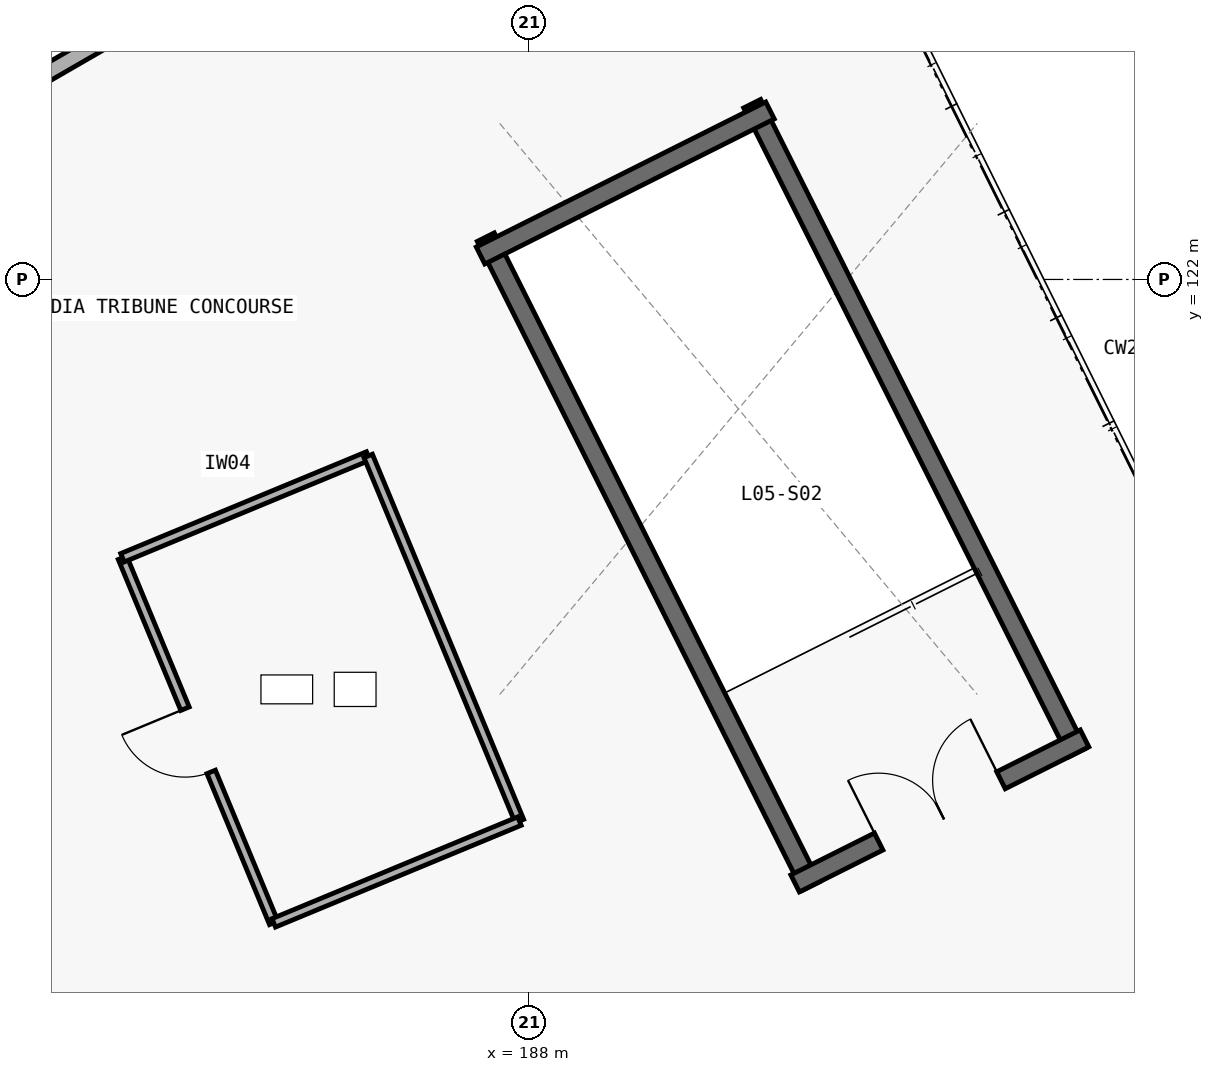
"""IFC4 building model, lengths in metres.
Left out: names, types, materials, properties, quantities, classifications, styles, units other than length and angle.
Written with IfcOpenShell. Run it as: python <this file> out.ifc"""

import sys

from ifc_helpers import new_model, si_unit, direction, frame, frame_2d, origin, place, context, subcontext, project, spatial, rectangle, extrude, element, fill, save


model = new_model("IFC4")
c1 = context("Model", 3, precision=1e-05, world=origin(), true_north=direction((0.0, 1.0)))
c2 = subcontext(c1, "Body", "Model", "MODEL_VIEW")
j1 = project(units=[si_unit("LENGTHUNIT", "METRE"), si_unit("PLANEANGLEUNIT", "RADIAN")], contexts=[c1])
p1 = place(None, origin())
s1 = spatial("IfcSite", under=j1, at=p1, CompositionType="ELEMENT")
p2 = place(p1, origin())
s2 = spatial("IfcBuilding", under=s1, at=p2, CompositionType="ELEMENT")
p3 = place(p2, frame((0.0, 0.0, 24.6)))
s3 = spatial("IfcBuildingStorey", under=s2, at=p3, CompositionType="ELEMENT", Elevation=24.6)
p4 = place(p3, frame((176.519, 121.75, 0.0), z_axis=(0.0, 0.0, 1.0), x_axis=(0.866019999656, 0.500009360108, 0.0)))
e1 = element("IfcWall", 1, at=p4, inside=s3, PredefinedType="PARAPET", context=c2, shape_type="SweptSolid", body=[
    extrude(rectangle(XDim=16.5, YDim=0.22, at=frame_2d((8.25, 0.0))), origin(), (0.0, 0.0, 1.0), 3.89),
])
for number, where, z_axis, x_axis in (
    (2, (195.215, 115.774, 0.0), (0.0, 0.0, 1.0), (-0.448, 0.894, 0.0)),
    (3, (187.432, 122.557, 0.0), (0.0, 0.0, 1.0), (0.448, -0.894, 0.0)),
):
    element("IfcWall", number, at=place(p3, frame(where, z_axis=z_axis, x_axis=x_axis)), inside=s3, PredefinedType="SHEAR", context=c2, shape_type="SweptSolid", body=[
        extrude(rectangle(XDim=9.55, YDim=0.25, at=frame_2d((4.775, 0.0))), origin(), (0.0, 0.0, 1.0), 4.62),
    ])
p5 = place(p3, frame((191.502, 114.054, 0.0), z_axis=(0.0, 0.0, 1.0), x_axis=(0.89409454548, 0.447878268888, 0.0)))
e4 = element("IfcWall", 4, at=p5, inside=s3, PredefinedType="SHEAR", context=c2, shape_type="SweptSolid", body=[
    extrude(rectangle(XDim=4.26, YDim=0.25, at=frame_2d((2.13, 0.0))), origin(), (0.0, 0.0, 1.0), 4.62),
])
p6 = place(p5, frame((1.23, 0.0, 0.0)))
e5 = element("IfcOpeningElement", 5, at=p6, cuts=e4, PredefinedType="OPENING", context=c2, shape_type="SweptSolid", body=[
    extrude(rectangle(XDim=1.8, YDim=2.25, at=frame_2d((0.9, 1.125))), frame((0.0, 0.135, 0.0), z_axis=(0.0, -1.0, 0.0), x_axis=(1.0, 0.0, 0.0)), (0.0, 0.0, 1.0), 0.27),
])
p7 = place(p3, frame((191.172, 124.223, 0.0), z_axis=(0.0, 0.0, 1.0), x_axis=(-0.89409454548, -0.447878268888, 0.0)))
e6 = element("IfcWall", 6, at=p7, inside=s3, PredefinedType="SHEAR", context=c2, shape_type="SweptSolid", body=[
    extrude(rectangle(XDim=4.26, YDim=0.25, at=frame_2d((2.13, 0.0))), origin(), (0.0, 0.0, 1.0), 4.62),
])
p8 = place(p3, frame((184.642, 113.535, 0.0), z_axis=(0.0, 0.0, 1.0), x_axis=(-0.38268766097, 0.923877780955, 0.0)))
e7 = element("IfcWall", 7, at=p8, inside=s3, PredefinedType="PARTITIONING", context=c2, shape_type="SweptSolid", body=[
    extrude(rectangle(XDim=5.2, YDim=0.12, at=frame_2d((2.6, 0.0))), origin(), (0.0, 0.0, 1.0), 4.6),
])
p9 = place(p8, frame((2.15, 0.0, 0.0)))
e8 = element("IfcOpeningElement", 8, at=p9, cuts=e7, PredefinedType="OPENING", context=c2, shape_type="SweptSolid", body=[
    extrude(rectangle(XDim=0.9, YDim=2.1, at=frame_2d((0.45, 1.05))), frame((0.0, 0.07, 0.0), z_axis=(0.0, -1.0, 0.0), x_axis=(1.0, 0.0, 0.0)), (0.0, 0.0, 1.0), 0.14),
])
p10 = place(p3, frame((182.652, 118.339, 0.0), z_axis=(0.0, 0.0, 1.0), x_axis=(0.923904592733, 0.382622926034, 0.0)))
e9 = element("IfcWall", 9, at=p10, inside=s3, PredefinedType="PARTITIONING", context=c2, shape_type="SweptSolid", body=[
    extrude(rectangle(XDim=3.499, YDim=0.12, at=frame_2d((1.75, 0.0))), origin(), (0.0, 0.0, 1.0), 4.6),
])
p11 = place(p3, frame((185.885, 119.678, 0.0), z_axis=(0.0, 0.0, 1.0), x_axis=(0.382704261034, -0.923870904719, 0.0)))
e10 = element("IfcWall", 10, at=p11, inside=s3, PredefinedType="PARTITIONING", context=c2, shape_type="SweptSolid", body=[
    extrude(rectangle(XDim=5.2, YDim=0.12, at=frame_2d((2.6, 0.0))), origin(), (0.0, 0.0, 1.0), 4.6),
])
p12 = place(p3, frame((187.875, 114.874, 0.0), z_axis=(0.0, 0.0, 1.0), x_axis=(-0.923879927009, -0.382682479961, 0.0)))
e11 = element("IfcWall", 11, at=p12, inside=s3, PredefinedType="PARTITIONING", context=c2, shape_type="SweptSolid", body=[
    extrude(rectangle(XDim=3.499, YDim=0.12, at=frame_2d((1.75, 0.0))), origin(), (0.0, 0.0, 1.0), 4.6),
])
p13 = place(p6, origin())
e12 = element("IfcDoor", 12, at=p13, inside=s3, OperationType="DOUBLE_DOOR_SINGLE_SWING", PredefinedType="DOOR", context=c2, shape_type="SweptSolid", body=[
    extrude(rectangle(XDim=1.8, YDim=2.25, at=frame_2d((0.9, 1.125))), frame((0.0, 0.025, 0.0), z_axis=(0.0, -1.0, 0.0), x_axis=(1.0, 0.0, 0.0)), (0.0, 0.0, 1.0), 0.05),
])
fill(e5, e12)
p14 = place(p9, origin())
e13 = element("IfcDoor", 13, at=p14, inside=s3, OperationType="SINGLE_SWING_RIGHT", PredefinedType="DOOR", context=c2, shape_type="SweptSolid", body=[
    extrude(rectangle(XDim=0.9, YDim=2.1, at=frame_2d((0.45, 1.05))), frame((0.0, 0.025, 0.0), z_axis=(0.0, -1.0, 0.0), x_axis=(1.0, 0.0, 0.0)), (0.0, 0.0, 1.0), 0.05),
])
fill(e8, e13)
save(model, sys.argv[1])
